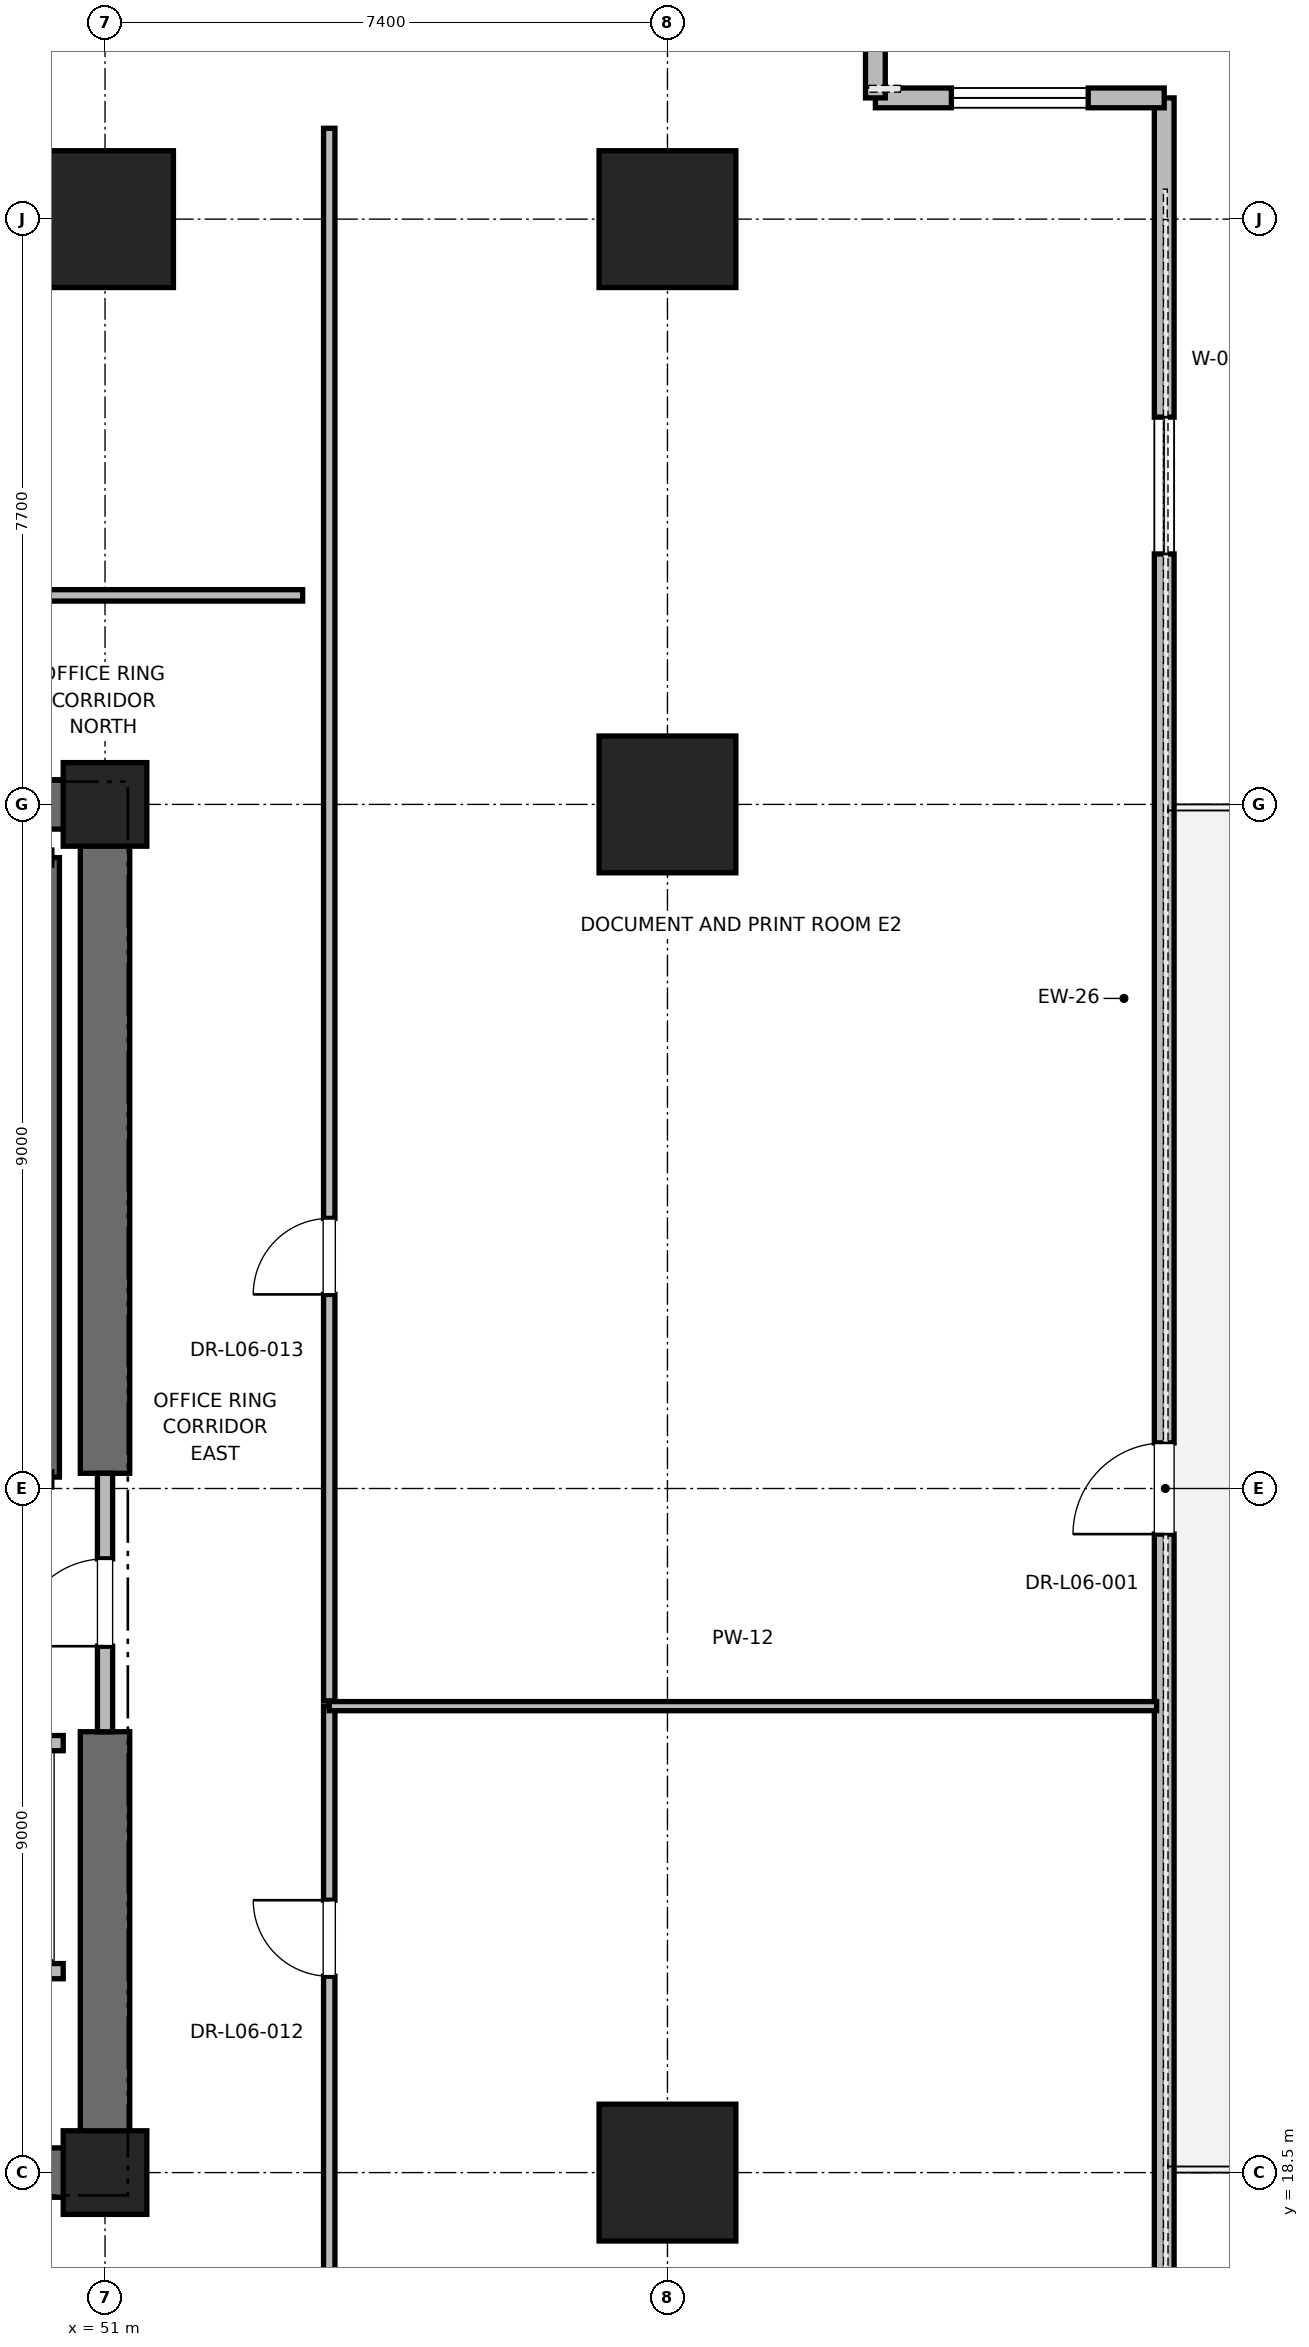
"""IFC4 building model, lengths in metres.
Left out: names, types, materials, properties, quantities, classifications, styles, units other than length and angle.
Written with IfcOpenShell. Run it as: python <this file> out.ifc"""

import sys

from ifc_helpers import new_model, si_unit, direction, frame, frame_2d, origin, origin_2d, place, context, subcontext, project, spatial, rectangle, extrude, element, fill, save


model = new_model("IFC4")
c1 = context("Model", 3, precision=1e-05, world=origin(), true_north=direction((0.0, 1.0)))
c2 = subcontext(c1, "Body", "Model", "MODEL_VIEW")
j1 = project(units=[si_unit("LENGTHUNIT", "METRE"), si_unit("PLANEANGLEUNIT", "RADIAN")], contexts=[c1])
p1 = place(None, origin())
s1 = spatial("IfcSite", under=j1, at=p1, CompositionType="ELEMENT")
p2 = place(p1, origin())
s2 = spatial("IfcBuilding", under=s1, at=p2, CompositionType="ELEMENT")
p3 = place(p2, frame((0.0, 0.0, 31.6)))
s3 = spatial("IfcBuildingStorey", under=s2, at=p3, CompositionType="ELEMENT", Elevation=31.6)
for number, where, z_axis, x_axis in (
    (1, (51.0, 44.2, 0.0), (0.0, 0.0, 1.0), (1.0, 0.0, 0.0)),
    (2, (58.4, 18.5, 0.0), (0.0, 0.0, 1.0), (1.0, 0.0, 0.0)),
    (3, (58.4, 36.5, 0.0), (0.0, 0.0, 1.0), (1.0, 0.0, 0.0)),
    (4, (58.4, 44.2, 0.0), (0.0, 0.0, 1.0), (1.0, 0.0, 0.0)),
):
    element("IfcColumn", number, at=place(p3, frame(where, z_axis=z_axis, x_axis=x_axis)), inside=s3, PredefinedType="COLUMN", context=c2, shape_type="SweptSolid", body=[
        extrude(rectangle(XDim=1.8, YDim=1.8, at=origin_2d()), origin(), (0.0, 0.0, 1.0), 4.0),
    ])
for number, where, z_axis, x_axis in (
    (5, (51.0, 18.5, 0.0), (0.0, 0.0, 1.0), (1.0, 0.0, 0.0)),
    (6, (51.0, 36.5, 0.0), (0.0, 0.0, 1.0), (1.0, 0.0, 0.0)),
):
    element("IfcColumn", number, at=place(p3, frame(where, z_axis=z_axis, x_axis=x_axis)), inside=s3, PredefinedType="PILASTER", context=c2, shape_type="SweptSolid", body=[
        extrude(rectangle(XDim=1.1, YDim=1.1, at=origin_2d()), origin(), (0.0, 0.0, 1.0), 4.0),
    ])
p4 = place(p3, frame((41.8, 18.5, 0.0), z_axis=(0.0, 0.0, 1.0), x_axis=(1.0, 0.0, 0.0)))
e7 = element("IfcWall", 7, at=p4, inside=s3, PredefinedType="SHEAR", context=c2, shape_type="SweptSolid", body=[
    extrude(rectangle(XDim=9.2, YDim=0.65, at=frame_2d((4.6, 0.0))), origin(), (0.0, 0.0, 1.0), 3.76),
])
for number, where, z_axis, x_axis in (
    (8, (45.2, 36.5, 0.0), (0.0, 0.0, 1.0), (1.0, 0.0, 0.0)),
    (9, (51.0, 18.5, 0.0), (0.0, 0.0, 1.0), (0.0, 1.0, 0.0)),
):
    element("IfcWall", number, at=place(p3, frame(where, z_axis=z_axis, x_axis=x_axis)), inside=s3, PredefinedType="SHEAR", context=c2, shape_type="SweptSolid", body=[
        extrude(rectangle(XDim=5.8, YDim=0.65, at=frame_2d((2.9, 0.0))), origin(), (0.0, 0.0, 1.0), 3.76),
    ])
p5 = place(p3, frame((51.0, 27.7, 0.0), z_axis=(0.0, 0.0, 1.0), x_axis=(0.0, 1.0, 0.0)))
e10 = element("IfcWall", 10, at=p5, inside=s3, PredefinedType="SHEAR", context=c2, shape_type="SweptSolid", body=[
    extrude(rectangle(XDim=8.8, YDim=0.65, at=frame_2d((4.4, 0.0))), origin(), (0.0, 0.0, 1.0), 3.76),
])
p6 = place(p3, frame((64.936, 9.205, 0.0), z_axis=(0.0, 0.0, 1.0), x_axis=(0.0, 1.0, 0.0)))
e11 = element("IfcWall", 11, at=p6, inside=s3, PredefinedType="PARAPET", context=c2, shape_type="SweptSolid", body=[
    extrude(rectangle(XDim=36.59, YDim=0.26, at=frame_2d((18.295, 0.0))), origin(), (0.0, 0.0, 1.0), 2.889),
])
p7 = place(p6, frame((4.2, 0.0, 0.85)))
e12 = element("IfcOpeningElement", 12, at=p7, cuts=e11, PredefinedType="OPENING", context=c2, shape_type="SweptSolid", body=[
    extrude(rectangle(XDim=1.8, YDim=2.2, at=frame_2d((0.9, 1.1))), frame((0.0, 0.13, 0.0), z_axis=(0.0, -1.0, 0.0), x_axis=(1.0, 0.0, 0.0)), (0.0, 0.0, 1.0), 0.26),
])
p8 = place(p6, frame((17.695, 0.0, 0.0)))
e13 = element("IfcOpeningElement", 13, at=p8, cuts=e11, PredefinedType="OPENING", context=c2, shape_type="SweptSolid", body=[
    extrude(rectangle(XDim=1.2, YDim=2.2, at=frame_2d((0.6, 1.1))), frame((0.0, 0.13, 0.0), z_axis=(0.0, -1.0, 0.0), x_axis=(1.0, 0.0, 0.0)), (0.0, 0.0, 1.0), 0.26),
])
p9 = place(p6, frame((30.59, 0.0, 0.85)))
e14 = element("IfcOpeningElement", 14, at=p9, cuts=e11, PredefinedType="OPENING", context=c2, shape_type="SweptSolid", body=[
    extrude(rectangle(XDim=1.8, YDim=2.2, at=frame_2d((0.9, 1.1))), frame((0.0, 0.13, 0.0), z_axis=(0.0, -1.0, 0.0), x_axis=(1.0, 0.0, 0.0)), (0.0, 0.0, 1.0), 0.26),
])
p10 = place(p3, frame((64.936, 45.795, 0.0), z_axis=(0.0, 0.0, 1.0), x_axis=(-1.0, 0.0, 0.0)))
e15 = element("IfcWall", 15, at=p10, inside=s3, PredefinedType="PARAPET", context=c2, shape_type="SweptSolid", body=[
    extrude(rectangle(XDim=3.8, YDim=0.26, at=frame_2d((1.9, 0.0))), origin(), (0.0, 0.0, 1.0), 3.76),
])
p11 = place(p10, frame((1.0, 0.0, 0.85)))
e16 = element("IfcOpeningElement", 16, at=p11, cuts=e15, PredefinedType="OPENING", context=c2, shape_type="SweptSolid", body=[
    extrude(rectangle(XDim=1.8, YDim=2.2, at=frame_2d((0.9, 1.1))), frame((0.0, 0.13, 0.0), z_axis=(0.0, -1.0, 0.0), x_axis=(1.0, 0.0, 0.0)), (0.0, 0.0, 1.0), 0.26),
])
p12 = place(p3, frame((61.136, 45.795, 0.0), z_axis=(0.0, 0.0, 1.0), x_axis=(0.0, 1.0, 0.0)))
e17 = element("IfcWall", 17, at=p12, inside=s3, PredefinedType="PARAPET", context=c2, shape_type="SweptSolid", body=[
    extrude(rectangle(XDim=3.4, YDim=0.26, at=frame_2d((1.7, 0.0))), origin(), (0.0, 0.0, 1.0), 3.76),
])
p13 = place(p3, frame((50.3, 27.65, 0.0), z_axis=(0.0, 0.0, 1.0), x_axis=(0.0, 1.0, 0.0)))
e18 = element("IfcWall", 18, at=p13, inside=s3, PredefinedType="SOLIDWALL", context=c2, shape_type="SweptSolid", body=[
    extrude(rectangle(XDim=8.15, YDim=0.2, at=frame_2d((4.075, 0.0))), origin(), (0.0, 0.0, 1.0), 3.76),
])
p14 = place(p3, frame((51.0, 24.3, 0.0), z_axis=(0.0, 0.0, 1.0), x_axis=(0.0, 1.0, 0.0)))
e19 = element("IfcWall", 19, at=p14, inside=s3, PredefinedType="PARTITIONING", context=c2, shape_type="SweptSolid", body=[
    extrude(rectangle(XDim=3.4, YDim=0.2, at=frame_2d((1.7, 0.0))), origin(), (0.0, 0.0, 1.0), 2.54),
])
p15 = place(p14, frame((1.125, 0.0, 0.0)))
e20 = element("IfcOpeningElement", 20, at=p15, cuts=e19, PredefinedType="OPENING", context=c2, shape_type="SweptSolid", body=[
    extrude(rectangle(XDim=1.15, YDim=2.2, at=frame_2d((0.575, 1.1))), frame((0.0, 0.1, 0.0), z_axis=(0.0, -1.0, 0.0), x_axis=(1.0, 0.0, 0.0)), (0.0, 0.0, 1.0), 0.2),
])
p16 = place(p3, frame((47.85, 21.15, 0.0), z_axis=(0.0, 0.0, 1.0), x_axis=(1.0, 0.0, 0.0)))
e21 = element("IfcWall", 21, at=p16, inside=s3, PredefinedType="SOLIDWALL", context=c2, shape_type="SweptSolid", body=[
    extrude(rectangle(XDim=2.6, YDim=0.2, at=frame_2d((1.3, 0.0))), origin(), (0.0, 0.0, 1.0), 3.76),
])
p17 = place(p3, frame((50.45, 24.15, 0.0), z_axis=(0.0, 0.0, 1.0), x_axis=(-1.0, 0.0, 0.0)))
e22 = element("IfcWall", 22, at=p17, inside=s3, PredefinedType="SOLIDWALL", context=c2, shape_type="SweptSolid", body=[
    extrude(rectangle(XDim=2.6, YDim=0.2, at=frame_2d((1.3, 0.0))), origin(), (0.0, 0.0, 1.0), 2.54),
])
p18 = place(p17, frame((0.75, 0.0, 0.0)))
e23 = element("IfcOpeningElement", 23, at=p18, cuts=e22, PredefinedType="OPENING", context=c2, shape_type="SweptSolid", body=[
    extrude(rectangle(XDim=1.1, YDim=2.2, at=frame_2d((0.55, 1.1))), frame((0.0, 0.1, 0.0), z_axis=(0.0, -1.0, 0.0), x_axis=(1.0, 0.0, 0.0)), (0.0, 0.0, 1.0), 0.2),
])
p19 = place(p3, frame((38.982, 39.25, 0.0), z_axis=(0.0, 0.0, 1.0), x_axis=(1.0, 0.0, 0.0)))
e24 = element("IfcWall", 24, at=p19, inside=s3, PredefinedType="PARTITIONING", context=c2, shape_type="SweptSolid", body=[
    extrude(rectangle(XDim=14.618, YDim=0.15, at=frame_2d((7.309, 0.0))), origin(), (0.0, 0.0, 1.0), 2.85),
])
p20 = place(p19, frame((6.734, 0.0, 0.0)))
e25 = element("IfcOpeningElement", 25, at=p20, cuts=e24, PredefinedType="OPENING", context=c2, shape_type="SweptSolid", body=[
    extrude(rectangle(XDim=1.05, YDim=2.2, at=frame_2d((0.525, 1.1))), frame((0.0, 0.075, 0.0), z_axis=(0.0, -1.0, 0.0), x_axis=(1.0, 0.0, 0.0)), (0.0, 0.0, 1.0), 0.15),
])
p21 = place(p3, frame((53.95, 9.605, 0.0), z_axis=(0.0, 0.0, 1.0), x_axis=(0.0, 1.0, 0.0)))
e26 = element("IfcWall", 26, at=p21, inside=s3, PredefinedType="PARTITIONING", context=c2, shape_type="SweptSolid", body=[
    extrude(rectangle(XDim=15.032, YDim=0.15, at=frame_2d((7.516, 0.0))), origin(), (0.0, 0.0, 1.0), 2.85),
])
p22 = place(p21, frame((11.479, 0.0, 0.0)))
e27 = element("IfcOpeningElement", 27, at=p22, cuts=e26, PredefinedType="OPENING", context=c2, shape_type="SweptSolid", body=[
    extrude(rectangle(XDim=1.0, YDim=2.15, at=frame_2d((0.5, 1.075))), frame((0.0, 0.075, 0.0), z_axis=(0.0, -1.0, 0.0), x_axis=(1.0, 0.0, 0.0)), (0.0, 0.0, 1.0), 0.15),
])
p23 = place(p3, frame((53.95, 24.637, 0.0), z_axis=(0.0, 0.0, 1.0), x_axis=(1.0, 0.0, 0.0)))
e28 = element("IfcWall", 28, at=p23, inside=s3, PredefinedType="PARTITIONING", context=c2, shape_type="SweptSolid", body=[
    extrude(rectangle(XDim=10.886, YDim=0.12, at=frame_2d((5.443, 0.0))), origin(), (0.0, 0.0, 1.0), 2.85),
])
p24 = place(p3, frame((53.95, 24.707, 0.0), z_axis=(0.0, 0.0, 1.0), x_axis=(0.0, 1.0, 0.0)))
e29 = element("IfcWall", 29, at=p24, inside=s3, PredefinedType="PARTITIONING", context=c2, shape_type="SweptSolid", body=[
    extrude(rectangle(XDim=20.688, YDim=0.15, at=frame_2d((10.344, 0.0))), origin(), (0.0, 0.0, 1.0), 2.85),
])
p25 = place(p24, frame((5.347, 0.0, 0.0)))
e30 = element("IfcOpeningElement", 30, at=p25, cuts=e29, PredefinedType="OPENING", context=c2, shape_type="SweptSolid", body=[
    extrude(rectangle(XDim=1.0, YDim=2.15, at=frame_2d((0.5, 1.075))), frame((0.0, 0.075, 0.0), z_axis=(0.0, -1.0, 0.0), x_axis=(1.0, 0.0, 0.0)), (0.0, 0.0, 1.0), 0.15),
])
p26 = place(p8, origin())
e31 = element("IfcDoor", 31, at=p26, inside=s3, OperationType="SINGLE_SWING_LEFT", PredefinedType="DOOR", context=c2, shape_type="SweptSolid", body=[
    extrude(rectangle(XDim=1.2, YDim=2.2, at=frame_2d((0.6, 1.1))), frame((0.0, 0.025, 0.0), z_axis=(0.0, -1.0, 0.0), x_axis=(1.0, 0.0, 0.0)), (0.0, 0.0, 1.0), 0.05),
])
fill(e13, e31)
p27 = place(p9, origin())
e32 = element("IfcWindow", 32, at=p27, inside=s3, PartitioningType="SINGLE_PANEL", PredefinedType="WINDOW", context=c2, shape_type="SweptSolid", body=[
    extrude(rectangle(XDim=1.8, YDim=2.2, at=frame_2d((0.9, 1.1))), frame((0.0, 0.03, 0.0), z_axis=(0.0, -1.0, 0.0), x_axis=(1.0, 0.0, 0.0)), (0.0, 0.0, 1.0), 0.06),
])
fill(e14, e32)
p28 = place(p11, origin())
e33 = element("IfcWindow", 33, at=p28, inside=s3, PartitioningType="SINGLE_PANEL", PredefinedType="WINDOW", context=c2, shape_type="SweptSolid", body=[
    extrude(rectangle(XDim=1.8, YDim=2.2, at=frame_2d((0.9, 1.1))), frame((0.0, 0.03, 0.0), z_axis=(0.0, -1.0, 0.0), x_axis=(1.0, 0.0, 0.0)), (0.0, 0.0, 1.0), 0.06),
])
fill(e16, e33)
p29 = place(p15, origin())
e34 = element("IfcDoor", 34, at=p29, inside=s3, OperationType="SINGLE_SWING_LEFT", PredefinedType="DOOR", context=c2, shape_type="SweptSolid", body=[
    extrude(rectangle(XDim=1.15, YDim=2.2, at=frame_2d((0.575, 1.1))), frame((0.0, 0.025, 0.0), z_axis=(0.0, -1.0, 0.0), x_axis=(1.0, 0.0, 0.0)), (0.0, 0.0, 1.0), 0.05),
])
fill(e20, e34)
p30 = place(p22, origin())
e35 = element("IfcDoor", 35, at=p30, inside=s3, OperationType="SINGLE_SWING_RIGHT", PredefinedType="DOOR", context=c2, shape_type="SweptSolid", body=[
    extrude(rectangle(XDim=1.0, YDim=2.15, at=frame_2d((0.5, 1.075))), frame((0.0, 0.025, 0.0), z_axis=(0.0, -1.0, 0.0), x_axis=(1.0, 0.0, 0.0)), (0.0, 0.0, 1.0), 0.05),
])
fill(e27, e35)
p31 = place(p25, origin())
e36 = element("IfcDoor", 36, at=p31, inside=s3, OperationType="SINGLE_SWING_LEFT", PredefinedType="DOOR", context=c2, shape_type="SweptSolid", body=[
    extrude(rectangle(XDim=1.0, YDim=2.15, at=frame_2d((0.5, 1.075))), frame((0.0, 0.025, 0.0), z_axis=(0.0, -1.0, 0.0), x_axis=(1.0, 0.0, 0.0)), (0.0, 0.0, 1.0), 0.05),
])
fill(e30, e36)
save(model, sys.argv[1])
